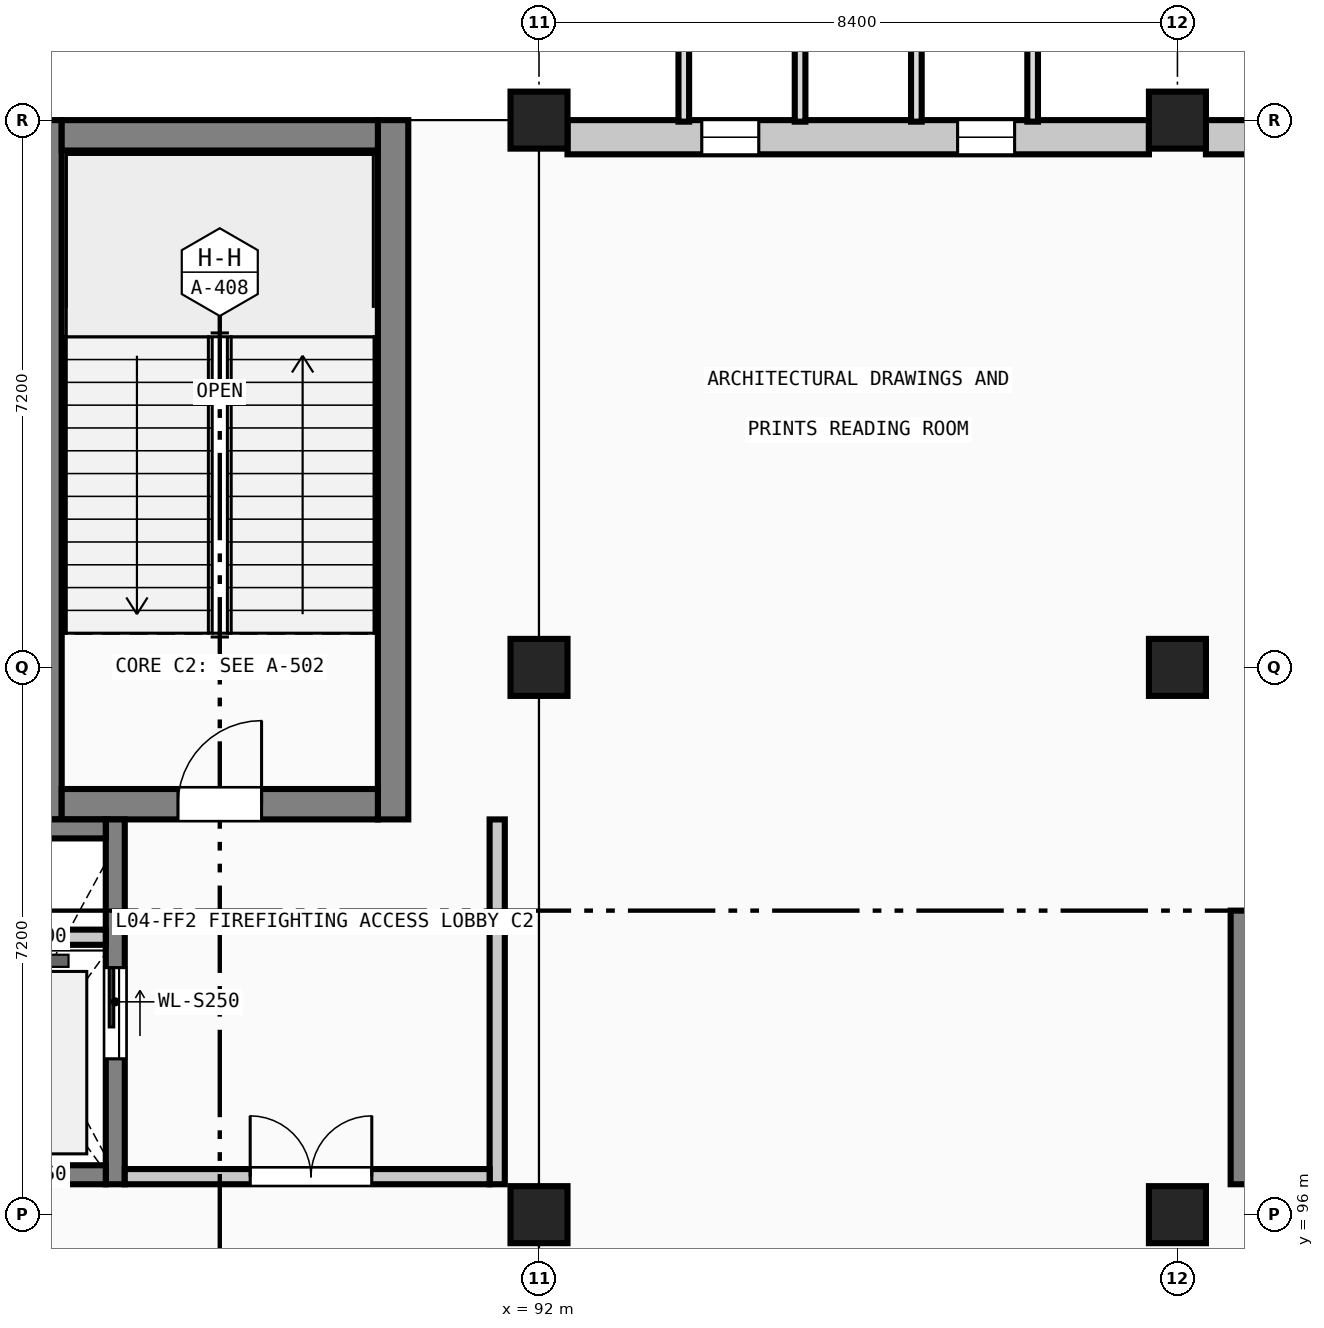
"""IFC4 building model, lengths in metres.
Left out: names, types, materials, properties, quantities, classifications, styles, units other than length and angle.
Written with IfcOpenShell. Run it as: python <this file> out.ifc"""

import sys

from ifc_helpers import new_model, si_unit, direction, frame, frame_2d, origin, origin_2d, place, context, subcontext, project, spatial, rectangle, extrude, element, fill, save


model = new_model("IFC4")
c1 = context("Model", 3, precision=1e-05, world=origin(), true_north=direction((0.0, 1.0)))
c2 = subcontext(c1, "Body", "Model", "MODEL_VIEW")
j1 = project(units=[si_unit("LENGTHUNIT", "METRE"), si_unit("PLANEANGLEUNIT", "RADIAN")], contexts=[c1])
p1 = place(None, origin())
s1 = spatial("IfcSite", under=j1, at=p1, CompositionType="ELEMENT")
p2 = place(p1, origin())
s2 = spatial("IfcBuilding", under=s1, at=p2, CompositionType="ELEMENT")
p3 = place(p2, frame((0.0, 0.0, 18.88)))
s3 = spatial("IfcBuildingStorey", under=s2, at=p3, CompositionType="ELEMENT", Elevation=18.88)
for number, where, z_axis, x_axis in (
    (1, (92.0, 96.0, 0.0), (0.0, 0.0, 1.0), (1.0, 0.0, 0.0)),
    (2, (92.0, 103.2, 0.0), (0.0, 0.0, 1.0), (1.0, 0.0, 0.0)),
    (3, (92.0, 110.4, 0.0), (0.0, 0.0, 1.0), (1.0, 0.0, 0.0)),
    (4, (100.4, 96.0, 0.0), (0.0, 0.0, 1.0), (1.0, 0.0, 0.0)),
    (5, (100.4, 103.2, 0.0), (0.0, 0.0, 1.0), (1.0, 0.0, 0.0)),
    (6, (100.4, 110.4, 0.0), (0.0, 0.0, 1.0), (1.0, 0.0, 0.0)),
):
    element("IfcColumn", number, at=place(p3, frame(where, z_axis=z_axis, x_axis=x_axis)), inside=s3, PredefinedType="COLUMN", context=c2, shape_type="SweptSolid", body=[
        extrude(rectangle(XDim=0.75, YDim=0.75, at=origin_2d()), origin(), (0.0, 0.0, 1.0), 4.48),
    ])
for number, where, z_axis, x_axis in (
    (7, (85.52, 101.2, 0.0), (0.0, 0.0, 1.0), (0.0, 1.0, 0.0)),
    (8, (90.08, 110.4, 0.0), (0.0, 0.0, 1.0), (0.0, -1.0, 0.0)),
):
    element("IfcWall", number, at=place(p3, frame(where, z_axis=z_axis, x_axis=x_axis)), inside=s3, PredefinedType="SHEAR", context=c2, shape_type="SweptSolid", body=[
        extrude(rectangle(XDim=9.2, YDim=0.4, at=frame_2d((4.6, 0.0))), origin(), (0.0, 0.0, 1.0), 4.205),
    ])
p4 = place(p3, frame((89.88, 101.4, 0.0), z_axis=(0.0, 0.0, 1.0), x_axis=(-1.0, 0.0, 0.0)))
e9 = element("IfcWall", 9, at=p4, inside=s3, PredefinedType="SHEAR", context=c2, shape_type="SweptSolid", body=[
    extrude(rectangle(XDim=4.16, YDim=0.4, at=frame_2d((2.08, 0.0))), origin(), (0.0, 0.0, 1.0), 4.205),
])
p5 = place(p4, frame((1.53, 0.0, 0.0)))
e10 = element("IfcOpeningElement", 10, at=p5, cuts=e9, PredefinedType="OPENING", context=c2, shape_type="SweptSolid", body=[
    extrude(rectangle(XDim=1.1, YDim=2.2, at=frame_2d((0.55, 1.1))), frame((0.0, 0.21, 0.0), z_axis=(0.0, -1.0, 0.0), x_axis=(1.0, 0.0, 0.0)), (0.0, 0.0, 1.0), 0.42),
])
p6 = place(p3, frame((85.72, 110.2, 0.0), z_axis=(0.0, 0.0, 1.0), x_axis=(1.0, 0.0, 0.0)))
e11 = element("IfcWall", 11, at=p6, inside=s3, PredefinedType="SHEAR", context=c2, shape_type="SweptSolid", body=[
    extrude(rectangle(XDim=4.16, YDim=0.4, at=frame_2d((2.08, 0.0))), origin(), (0.0, 0.0, 1.0), 4.205),
])
p7 = place(p3, frame((86.425, 101.2, 0.0), z_axis=(0.0, 0.0, 1.0), x_axis=(0.0, -1.0, 0.0)))
e12 = element("IfcWall", 12, at=p7, inside=s3, PredefinedType="SOLIDWALL", context=c2, shape_type="SweptSolid", body=[
    extrude(rectangle(XDim=4.8, YDim=0.25, at=frame_2d((2.4, 0.0))), origin(), (0.0, 0.0, 1.0), 4.205),
])
p8 = place(p7, frame((1.95, 0.0, 0.0)))
e13 = element("IfcOpeningElement", 13, at=p8, cuts=e12, PredefinedType="OPENING", context=c2, shape_type="SweptSolid", body=[
    extrude(rectangle(XDim=1.2, YDim=2.2, at=frame_2d((0.6, 1.1))), frame((0.0, 0.135, 0.0), z_axis=(0.0, -1.0, 0.0), x_axis=(1.0, 0.0, 0.0)), (0.0, 0.0, 1.0), 0.27),
])
for number, where, z_axis, x_axis in (
    (14, (86.3, 96.525, 0.0), (0.0, 0.0, 1.0), (-1.0, 0.0, 0.0)),
    (15, (84.2, 101.075, 0.0), (0.0, 0.0, 1.0), (1.0, 0.0, 0.0)),
):
    element("IfcWall", number, at=place(p3, frame(where, z_axis=z_axis, x_axis=x_axis)), inside=s3, PredefinedType="SOLIDWALL", context=c2, shape_type="SweptSolid", body=[
        extrude(rectangle(XDim=2.1, YDim=0.25, at=frame_2d((1.05, 0.0))), origin(), (0.0, 0.0, 1.0), 4.205),
    ])
p9 = place(p3, frame((84.2, 99.65, 0.0), z_axis=(0.0, 0.0, 1.0), x_axis=(1.0, 0.0, 0.0)))
e16 = element("IfcWall", 16, at=p9, inside=s3, PredefinedType="SOLIDWALL", context=c2, shape_type="SweptSolid", body=[
    extrude(rectangle(XDim=2.1, YDim=0.2, at=frame_2d((1.05, 0.0))), origin(), (0.0, 0.0, 1.0), 4.205),
])
p10 = place(p3, frame((91.45, 101.2, 0.0), z_axis=(0.0, 0.0, 1.0), x_axis=(0.0, -1.0, 0.0)))
e17 = element("IfcWall", 17, at=p10, inside=s3, PredefinedType="SOLIDWALL", context=c2, shape_type="SweptSolid", body=[
    extrude(rectangle(XDim=4.8, YDim=0.2, at=frame_2d((2.4, 0.0))), origin(), (0.0, 0.0, 1.0), 4.205),
])
p11 = place(p3, frame((91.35, 96.5, 0.0), z_axis=(0.0, 0.0, 1.0), x_axis=(-1.0, 0.0, 0.0)))
e18 = element("IfcWall", 18, at=p11, inside=s3, PredefinedType="SOLIDWALL", context=c2, shape_type="SweptSolid", body=[
    extrude(rectangle(XDim=4.8, YDim=0.2, at=frame_2d((2.4, 0.0))), origin(), (0.0, 0.0, 1.0), 4.205),
])
p12 = place(p11, frame((1.55, 0.0, 0.0)))
e19 = element("IfcOpeningElement", 19, at=p12, cuts=e18, PredefinedType="OPENING", context=c2, shape_type="SweptSolid", body=[
    extrude(rectangle(XDim=1.6, YDim=2.2, at=frame_2d((0.8, 1.1))), frame((0.0, 0.11, 0.0), z_axis=(0.0, -1.0, 0.0), x_axis=(1.0, 0.0, 0.0)), (0.0, 0.0, 1.0), 0.22),
])
p13 = place(p3, frame((101.225, 96.4, 0.0), z_axis=(0.0, 0.0, 1.0), x_axis=(0.0, 1.0, 0.0)))
e20 = element("IfcWall", 20, at=p13, inside=s3, PredefinedType="SOLIDWALL", context=c2, shape_type="SweptSolid", body=[
    extrude(rectangle(XDim=3.6, YDim=0.25, at=frame_2d((1.8, 0.0))), origin(), (0.0, 0.0, 1.0), 4.255),
])
p14 = place(p3, frame((92.375, 110.175, 0.0), z_axis=(0.0, 0.0, 1.0), x_axis=(1.0, 0.0, 0.0)))
e21 = element("IfcWall", 21, at=p14, inside=s3, PredefinedType="SOLIDWALL", context=c2, shape_type="SweptSolid", body=[
    extrude(rectangle(XDim=7.65, YDim=0.45, at=frame_2d((3.825, 0.0))), origin(), (0.0, 0.0, 1.0), 3.53),
])
p15 = place(p14, frame((1.767, 0.0, 0.9)))
e22 = element("IfcOpeningElement", 22, at=p15, cuts=e21, PredefinedType="OPENING", context=c2, shape_type="SweptSolid", body=[
    extrude(rectangle(XDim=0.75, YDim=2.4, at=frame_2d((0.375, 1.2))), frame((0.0, 0.235, 0.0), z_axis=(0.0, -1.0, 0.0), x_axis=(1.0, 0.0, 0.0)), (0.0, 0.0, 1.0), 0.47),
])
p16 = place(p14, frame((5.133, 0.0, 0.9)))
e23 = element("IfcOpeningElement", 23, at=p16, cuts=e21, PredefinedType="OPENING", context=c2, shape_type="SweptSolid", body=[
    extrude(rectangle(XDim=0.75, YDim=2.4, at=frame_2d((0.375, 1.2))), frame((0.0, 0.235, 0.0), z_axis=(0.0, -1.0, 0.0), x_axis=(1.0, 0.0, 0.0)), (0.0, 0.0, 1.0), 0.47),
])
p17 = place(p3, frame((100.775, 110.175, 0.0), z_axis=(0.0, 0.0, 1.0), x_axis=(1.0, 0.0, 0.0)))
e24 = element("IfcWall", 24, at=p17, inside=s3, PredefinedType="SOLIDWALL", context=c2, shape_type="SweptSolid", body=[
    extrude(rectangle(XDim=7.65, YDim=0.45, at=frame_2d((3.825, 0.0))), origin(), (0.0, 0.0, 1.0), 3.53),
])
p18 = place(p17, frame((1.767, 0.0, 0.9)))
e25 = element("IfcOpeningElement", 25, at=p18, cuts=e24, PredefinedType="OPENING", context=c2, shape_type="SweptSolid", body=[
    extrude(rectangle(XDim=0.75, YDim=2.4, at=frame_2d((0.375, 1.2))), frame((0.0, 0.235, 0.0), z_axis=(0.0, -1.0, 0.0), x_axis=(1.0, 0.0, 0.0)), (0.0, 0.0, 1.0), 0.47),
])
p19 = place(p17, frame((5.133, 0.0, 0.9)))
e26 = element("IfcOpeningElement", 26, at=p19, cuts=e24, PredefinedType="OPENING", context=c2, shape_type="SweptSolid", body=[
    extrude(rectangle(XDim=0.75, YDim=2.4, at=frame_2d((0.375, 1.2))), frame((0.0, 0.235, 0.0), z_axis=(0.0, -1.0, 0.0), x_axis=(1.0, 0.0, 0.0)), (0.0, 0.0, 1.0), 0.47),
])
p20 = place(p5, frame((1.1, 0.0, 0.0), z_axis=(0.0, 0.0, 1.0), x_axis=(-1.0, 0.0, 0.0)))
e27 = element("IfcDoor", 27, at=p20, inside=s3, OperationType="SINGLE_SWING_RIGHT", PredefinedType="DOOR", context=c2, shape_type="SweptSolid", body=[
    extrude(rectangle(XDim=1.1, YDim=2.2, at=frame_2d((0.55, 1.1))), frame((0.0, 0.025, 0.0), z_axis=(0.0, -1.0, 0.0), x_axis=(1.0, 0.0, 0.0)), (0.0, 0.0, 1.0), 0.05),
])
fill(e10, e27)
p21 = place(p8, origin())
e28 = element("IfcDoor", 28, at=p21, inside=s3, OperationType="SLIDING_TO_LEFT", PredefinedType="DOOR", context=c2, shape_type="SweptSolid", body=[
    extrude(rectangle(XDim=1.2, YDim=2.2, at=frame_2d((0.6, 1.1))), frame((0.0, 0.025, 0.0), z_axis=(0.0, -1.0, 0.0), x_axis=(1.0, 0.0, 0.0)), (0.0, 0.0, 1.0), 0.05),
])
fill(e13, e28)
p22 = place(p12, frame((1.6, 0.0, 0.0), z_axis=(0.0, 0.0, 1.0), x_axis=(-1.0, 0.0, 0.0)))
e29 = element("IfcDoor", 29, at=p22, inside=s3, OperationType="DOUBLE_DOOR_SINGLE_SWING", PredefinedType="DOOR", context=c2, shape_type="SweptSolid", body=[
    extrude(rectangle(XDim=1.6, YDim=2.2, at=frame_2d((0.8, 1.1))), frame((0.0, 0.025, 0.0), z_axis=(0.0, -1.0, 0.0), x_axis=(1.0, 0.0, 0.0)), (0.0, 0.0, 1.0), 0.05),
])
fill(e19, e29)
p23 = place(p15, origin())
e30 = element("IfcWindow", 30, at=p23, inside=s3, PartitioningType="SINGLE_PANEL", PredefinedType="WINDOW", context=c2, shape_type="SweptSolid", body=[
    extrude(rectangle(XDim=0.75, YDim=2.4, at=frame_2d((0.375, 1.2))), frame((0.0, 0.03, 0.0), z_axis=(0.0, -1.0, 0.0), x_axis=(1.0, 0.0, 0.0)), (0.0, 0.0, 1.0), 0.06),
])
fill(e22, e30)
p24 = place(p16, origin())
e31 = element("IfcWindow", 31, at=p24, inside=s3, PartitioningType="SINGLE_PANEL", PredefinedType="WINDOW", context=c2, shape_type="SweptSolid", body=[
    extrude(rectangle(XDim=0.75, YDim=2.4, at=frame_2d((0.375, 1.2))), frame((0.0, 0.03, 0.0), z_axis=(0.0, -1.0, 0.0), x_axis=(1.0, 0.0, 0.0)), (0.0, 0.0, 1.0), 0.06),
])
fill(e23, e31)
save(model, sys.argv[1])
